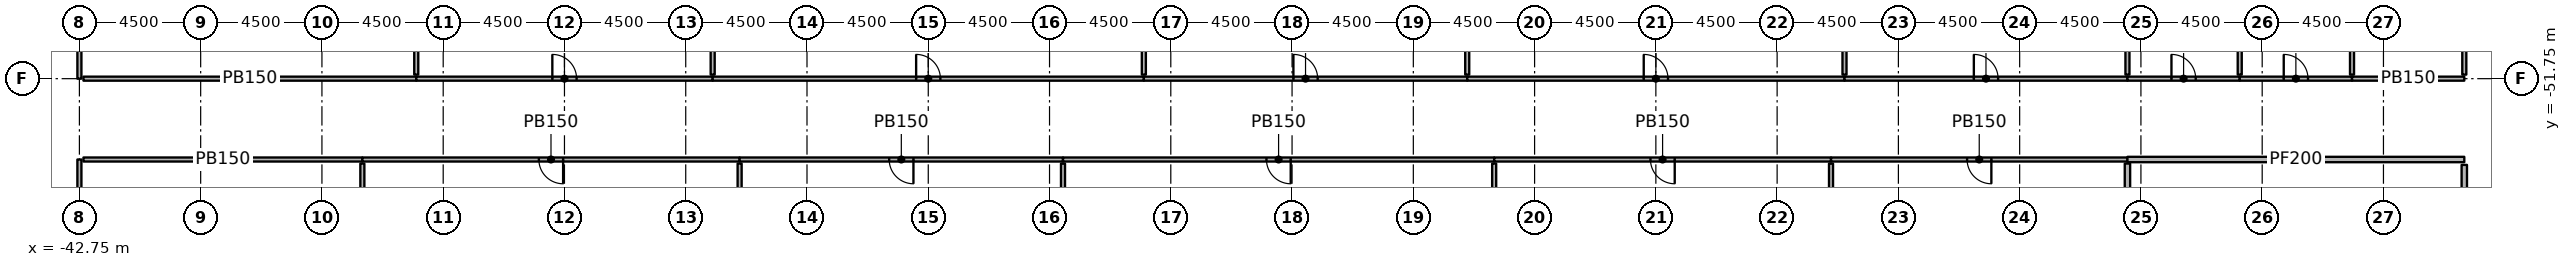
"""IFC4 building model, lengths in metres.
Left out: names, types, materials, properties, quantities, classifications, styles, units other than length and angle.
Written with IfcOpenShell. Run it as: python <this file> out.ifc"""

import sys

from ifc_helpers import new_model, si_unit, direction, frame, frame_2d, origin, place, context, subcontext, project, spatial, rectangle, extrude, element, fill, save


model = new_model("IFC4")
c1 = context("Model", 3, precision=1e-05, world=origin(), true_north=direction((0.0, 1.0)))
c2 = subcontext(c1, "Body", "Model", "MODEL_VIEW")
j1 = project(units=[si_unit("LENGTHUNIT", "METRE"), si_unit("PLANEANGLEUNIT", "RADIAN")], contexts=[c1])
p1 = place(None, origin())
s1 = spatial("IfcSite", under=j1, at=p1, CompositionType="ELEMENT")
p2 = place(p1, origin())
s2 = spatial("IfcBuilding", under=s1, at=p2, CompositionType="ELEMENT")
p3 = place(p2, frame((0.0, 0.0, -4.0)))
s3 = spatial("IfcBuildingStorey", under=s2, at=p3, CompositionType="ELEMENT", Elevation=-4.0)
p4 = place(p3, frame((-42.75, -54.75, 0.0), z_axis=(0.0, 0.0, 1.0), x_axis=(0.0, -1.0, 0.0)))
e1 = element("IfcWall", 1, at=p4, inside=s3, PredefinedType="PARTITIONING", context=c2, shape_type="SweptSolid", body=[
    extrude(rectangle(XDim=15.0, YDim=0.15, at=frame_2d((7.5, 0.0))), origin(), (0.0, 0.0, 1.0), 3.1),
])
p5 = place(p4, frame((7.05, 0.0, 0.0)))
e2 = element("IfcOpeningElement", 2, at=p5, cuts=e1, PredefinedType="OPENING", context=c2, shape_type="SweptSolid", body=[
    extrude(rectangle(XDim=0.9, YDim=2.1, at=frame_2d((0.45, 1.05))), frame((0.0, 0.085, 0.0), z_axis=(0.0, -1.0, 0.0), x_axis=(1.0, 0.0, 0.0)), (0.0, 0.0, 1.0), 0.17),
])
p6 = place(p3, frame((-42.75, -36.75, 0.0), z_axis=(0.0, 0.0, 1.0), x_axis=(0.0, -1.0, 0.0)))
e3 = element("IfcWall", 3, at=p6, inside=s3, PredefinedType="PARTITIONING", context=c2, shape_type="SweptSolid", body=[
    extrude(rectangle(XDim=15.0, YDim=0.15, at=frame_2d((7.5, 0.0))), origin(), (0.0, 0.0, 1.0), 3.1),
])
p7 = place(p6, frame((7.05, 0.0, 0.0)))
e4 = element("IfcOpeningElement", 4, at=p7, cuts=e3, PredefinedType="OPENING", context=c2, shape_type="SweptSolid", body=[
    extrude(rectangle(XDim=0.9, YDim=2.1, at=frame_2d((0.45, 1.05))), frame((0.0, 0.085, 0.0), z_axis=(0.0, -1.0, 0.0), x_axis=(1.0, 0.0, 0.0)), (0.0, 0.0, 1.0), 0.17),
])
p8 = place(p3, frame((-32.25, -54.75, 0.0), z_axis=(0.0, 0.0, 1.0), x_axis=(-1.0, 0.0, 0.0)))
e5 = element("IfcWall", 5, at=p8, inside=s3, PredefinedType="PARTITIONING", context=c2, shape_type="SweptSolid", body=[
    extrude(rectangle(XDim=10.35, YDim=0.15, at=frame_2d((5.175, 0.0))), origin(), (0.0, 0.0, 1.0), 3.1),
])
p9 = place(p3, frame((-18.25, -54.75, 0.0), z_axis=(0.0, 0.0, 1.0), x_axis=(-1.0, 0.0, 0.0)))
e6 = element("IfcWall", 6, at=p9, inside=s3, PredefinedType="PARTITIONING", context=c2, shape_type="SweptSolid", body=[
    extrude(rectangle(XDim=14.0, YDim=0.15, at=frame_2d((7.0, 0.0))), origin(), (0.0, 0.0, 1.0), 3.1),
])
p10 = place(p9, frame((6.55, 0.0, 0.0)))
e7 = element("IfcOpeningElement", 7, at=p10, cuts=e6, PredefinedType="OPENING", context=c2, shape_type="SweptSolid", body=[
    extrude(rectangle(XDim=0.9, YDim=2.1, at=frame_2d((0.45, 1.05))), frame((0.0, 0.085, 0.0), z_axis=(0.0, -1.0, 0.0), x_axis=(1.0, 0.0, 0.0)), (0.0, 0.0, 1.0), 0.17),
])
p11 = place(p3, frame((-6.25, -54.75, 0.0), z_axis=(0.0, 0.0, 1.0), x_axis=(-1.0, 0.0, 0.0)))
e8 = element("IfcWall", 8, at=p11, inside=s3, PredefinedType="PARTITIONING", context=c2, shape_type="SweptSolid", body=[
    extrude(rectangle(XDim=12.0, YDim=0.15, at=frame_2d((6.0, 0.0))), origin(), (0.0, 0.0, 1.0), 3.1),
])
p12 = place(p11, frame((5.55, 0.0, 0.0)))
e9 = element("IfcOpeningElement", 9, at=p12, cuts=e8, PredefinedType="OPENING", context=c2, shape_type="SweptSolid", body=[
    extrude(rectangle(XDim=0.9, YDim=2.1, at=frame_2d((0.45, 1.05))), frame((0.0, 0.085, 0.0), z_axis=(0.0, -1.0, 0.0), x_axis=(1.0, 0.0, 0.0)), (0.0, 0.0, 1.0), 0.17),
])
p13 = place(p3, frame((9.75, -54.75, 0.0), z_axis=(0.0, 0.0, 1.0), x_axis=(-1.0, 0.0, 0.0)))
e10 = element("IfcWall", 10, at=p13, inside=s3, PredefinedType="PARTITIONING", context=c2, shape_type="SweptSolid", body=[
    extrude(rectangle(XDim=16.0, YDim=0.15, at=frame_2d((8.0, 0.0))), origin(), (0.0, 0.0, 1.0), 3.1),
])
p14 = place(p13, frame((7.55, 0.0, 0.0)))
e11 = element("IfcOpeningElement", 11, at=p14, cuts=e10, PredefinedType="OPENING", context=c2, shape_type="SweptSolid", body=[
    extrude(rectangle(XDim=0.9, YDim=2.1, at=frame_2d((0.45, 1.05))), frame((0.0, 0.085, 0.0), z_axis=(0.0, -1.0, 0.0), x_axis=(1.0, 0.0, 0.0)), (0.0, 0.0, 1.0), 0.17),
])
p15 = place(p3, frame((22.25, -54.75, 0.0), z_axis=(0.0, 0.0, 1.0), x_axis=(-1.0, 0.0, 0.0)))
e12 = element("IfcWall", 12, at=p15, inside=s3, PredefinedType="PARTITIONING", context=c2, shape_type="SweptSolid", body=[
    extrude(rectangle(XDim=12.5, YDim=0.15, at=frame_2d((6.25, 0.0))), origin(), (0.0, 0.0, 1.0), 3.1),
])
p16 = place(p15, frame((5.8, 0.0, 0.0)))
e13 = element("IfcOpeningElement", 13, at=p16, cuts=e12, PredefinedType="OPENING", context=c2, shape_type="SweptSolid", body=[
    extrude(rectangle(XDim=0.9, YDim=2.1, at=frame_2d((0.45, 1.05))), frame((0.0, 0.085, 0.0), z_axis=(0.0, -1.0, 0.0), x_axis=(1.0, 0.0, 0.0)), (0.0, 0.0, 1.0), 0.17),
])
p17 = place(p3, frame((33.25, -54.75, 0.0), z_axis=(0.0, 0.0, 1.0), x_axis=(-1.0, 0.0, 0.0)))
e14 = element("IfcWall", 14, at=p17, inside=s3, PredefinedType="PARTITIONING", context=c2, shape_type="SweptSolid", body=[
    extrude(rectangle(XDim=11.0, YDim=0.15, at=frame_2d((5.5, 0.0))), origin(), (0.0, 0.0, 1.0), 3.1),
])
p18 = place(p17, frame((5.05, 0.0, 0.0)))
e15 = element("IfcOpeningElement", 15, at=p18, cuts=e14, PredefinedType="OPENING", context=c2, shape_type="SweptSolid", body=[
    extrude(rectangle(XDim=0.9, YDim=2.1, at=frame_2d((0.45, 1.05))), frame((0.0, 0.085, 0.0), z_axis=(0.0, -1.0, 0.0), x_axis=(1.0, 0.0, 0.0)), (0.0, 0.0, 1.0), 0.17),
])
p19 = place(p3, frame((45.75, -54.75, 0.0), z_axis=(0.0, 0.0, 1.0), x_axis=(-1.0, 0.0, 0.0)))
e16 = element("IfcWall", 16, at=p19, inside=s3, PredefinedType="PARTITIONING", context=c2, shape_type="SweptSolid", body=[
    extrude(rectangle(XDim=12.5, YDim=0.2, at=frame_2d((6.25, 0.0))), origin(), (0.0, 0.0, 1.0), 3.1),
])
p20 = place(p3, frame((-42.6, -51.75, 0.0), z_axis=(0.0, 0.0, 1.0), x_axis=(1.0, 0.0, 0.0)))
e17 = element("IfcWall", 17, at=p20, inside=s3, PredefinedType="PARTITIONING", context=c2, shape_type="SweptSolid", body=[
    extrude(rectangle(XDim=12.35, YDim=0.15, at=frame_2d((6.175, 0.0))), origin(), (0.0, 0.0, 1.0), 3.1),
])
p21 = place(p3, frame((-30.25, -51.75, 0.0), z_axis=(0.0, 0.0, 1.0), x_axis=(1.0, 0.0, 0.0)))
e18 = element("IfcWall", 18, at=p21, inside=s3, PredefinedType="PARTITIONING", context=c2, shape_type="SweptSolid", body=[
    extrude(rectangle(XDim=11.0, YDim=0.15, at=frame_2d((5.5, 0.0))), origin(), (0.0, 0.0, 1.0), 3.1),
])
p22 = place(p21, frame((5.05, 0.0, 0.0)))
e19 = element("IfcOpeningElement", 19, at=p22, cuts=e18, PredefinedType="OPENING", context=c2, shape_type="SweptSolid", body=[
    extrude(rectangle(XDim=0.9, YDim=2.1, at=frame_2d((0.45, 1.05))), frame((0.0, 0.085, 0.0), z_axis=(0.0, -1.0, 0.0), x_axis=(1.0, 0.0, 0.0)), (0.0, 0.0, 1.0), 0.17),
])
p23 = place(p3, frame((-19.25, -51.75, 0.0), z_axis=(0.0, 0.0, 1.0), x_axis=(1.0, 0.0, 0.0)))
e20 = element("IfcWall", 20, at=p23, inside=s3, PredefinedType="PARTITIONING", context=c2, shape_type="SweptSolid", body=[
    extrude(rectangle(XDim=16.0, YDim=0.15, at=frame_2d((8.0, 0.0))), origin(), (0.0, 0.0, 1.0), 3.1),
])
p24 = place(p23, frame((7.55, 0.0, 0.0)))
e21 = element("IfcOpeningElement", 21, at=p24, cuts=e20, PredefinedType="OPENING", context=c2, shape_type="SweptSolid", body=[
    extrude(rectangle(XDim=0.9, YDim=2.1, at=frame_2d((0.45, 1.05))), frame((0.0, 0.085, 0.0), z_axis=(0.0, -1.0, 0.0), x_axis=(1.0, 0.0, 0.0)), (0.0, 0.0, 1.0), 0.17),
])
p25 = place(p3, frame((-3.25, -51.75, 0.0), z_axis=(0.0, 0.0, 1.0), x_axis=(1.0, 0.0, 0.0)))
e22 = element("IfcWall", 22, at=p25, inside=s3, PredefinedType="PARTITIONING", context=c2, shape_type="SweptSolid", body=[
    extrude(rectangle(XDim=12.0, YDim=0.15, at=frame_2d((6.0, 0.0))), origin(), (0.0, 0.0, 1.0), 3.1),
])
p26 = place(p25, frame((5.55, 0.0, 0.0)))
e23 = element("IfcOpeningElement", 23, at=p26, cuts=e22, PredefinedType="OPENING", context=c2, shape_type="SweptSolid", body=[
    extrude(rectangle(XDim=0.9, YDim=2.1, at=frame_2d((0.45, 1.05))), frame((0.0, 0.085, 0.0), z_axis=(0.0, -1.0, 0.0), x_axis=(1.0, 0.0, 0.0)), (0.0, 0.0, 1.0), 0.17),
])
p27 = place(p3, frame((8.75, -51.75, 0.0), z_axis=(0.0, 0.0, 1.0), x_axis=(1.0, 0.0, 0.0)))
e24 = element("IfcWall", 24, at=p27, inside=s3, PredefinedType="PARTITIONING", context=c2, shape_type="SweptSolid", body=[
    extrude(rectangle(XDim=14.0, YDim=0.15, at=frame_2d((7.0, 0.0))), origin(), (0.0, 0.0, 1.0), 3.1),
])
p28 = place(p27, frame((6.55, 0.0, 0.0)))
e25 = element("IfcOpeningElement", 25, at=p28, cuts=e24, PredefinedType="OPENING", context=c2, shape_type="SweptSolid", body=[
    extrude(rectangle(XDim=0.9, YDim=2.1, at=frame_2d((0.45, 1.05))), frame((0.0, 0.085, 0.0), z_axis=(0.0, -1.0, 0.0), x_axis=(1.0, 0.0, 0.0)), (0.0, 0.0, 1.0), 0.17),
])
p29 = place(p3, frame((22.75, -51.75, 0.0), z_axis=(0.0, 0.0, 1.0), x_axis=(1.0, 0.0, 0.0)))
e26 = element("IfcWall", 26, at=p29, inside=s3, PredefinedType="PARTITIONING", context=c2, shape_type="SweptSolid", body=[
    extrude(rectangle(XDim=10.5, YDim=0.15, at=frame_2d((5.25, 0.0))), origin(), (0.0, 0.0, 1.0), 3.1),
])
p30 = place(p29, frame((4.8, 0.0, 0.0)))
e27 = element("IfcOpeningElement", 27, at=p30, cuts=e26, PredefinedType="OPENING", context=c2, shape_type="SweptSolid", body=[
    extrude(rectangle(XDim=0.9, YDim=2.1, at=frame_2d((0.45, 1.05))), frame((0.0, 0.085, 0.0), z_axis=(0.0, -1.0, 0.0), x_axis=(1.0, 0.0, 0.0)), (0.0, 0.0, 1.0), 0.17),
])
p31 = place(p3, frame((33.25, -51.75, 0.0), z_axis=(0.0, 0.0, 1.0), x_axis=(1.0, 0.0, 0.0)))
e28 = element("IfcWall", 28, at=p31, inside=s3, PredefinedType="PARTITIONING", context=c2, shape_type="SweptSolid", body=[
    extrude(rectangle(XDim=4.167, YDim=0.15, at=frame_2d((2.083, 0.0))), origin(), (0.0, 0.0, 1.0), 3.1),
])
p32 = place(p31, frame((1.633, 0.0, 0.0)))
e29 = element("IfcOpeningElement", 29, at=p32, cuts=e28, PredefinedType="OPENING", context=c2, shape_type="SweptSolid", body=[
    extrude(rectangle(XDim=0.9, YDim=2.1, at=frame_2d((0.45, 1.05))), frame((0.0, 0.085, 0.0), z_axis=(0.0, -1.0, 0.0), x_axis=(1.0, 0.0, 0.0)), (0.0, 0.0, 1.0), 0.17),
])
p33 = place(p3, frame((37.417, -51.75, 0.0), z_axis=(0.0, 0.0, 1.0), x_axis=(1.0, 0.0, 0.0)))
e30 = element("IfcWall", 30, at=p33, inside=s3, PredefinedType="PARTITIONING", context=c2, shape_type="SweptSolid", body=[
    extrude(rectangle(XDim=4.167, YDim=0.15, at=frame_2d((2.083, 0.0))), origin(), (0.0, 0.0, 1.0), 3.1),
])
p34 = place(p33, frame((1.633, 0.0, 0.0)))
e31 = element("IfcOpeningElement", 31, at=p34, cuts=e30, PredefinedType="OPENING", context=c2, shape_type="SweptSolid", body=[
    extrude(rectangle(XDim=0.9, YDim=2.1, at=frame_2d((0.45, 1.05))), frame((0.0, 0.085, 0.0), z_axis=(0.0, -1.0, 0.0), x_axis=(1.0, 0.0, 0.0)), (0.0, 0.0, 1.0), 0.17),
])
p35 = place(p3, frame((41.583, -51.75, 0.0), z_axis=(0.0, 0.0, 1.0), x_axis=(1.0, 0.0, 0.0)))
e32 = element("IfcWall", 32, at=p35, inside=s3, PredefinedType="PARTITIONING", context=c2, shape_type="SweptSolid", body=[
    extrude(rectangle(XDim=4.167, YDim=0.15, at=frame_2d((2.083, 0.0))), origin(), (0.0, 0.0, 1.0), 3.1),
])
for number, where, z_axis, x_axis in (
    (33, (-32.25, -54.9, 0.0), (0.0, 0.0, 1.0), (0.0, -1.0, 0.0)),
    (34, (-18.25, -54.9, 0.0), (0.0, 0.0, 1.0), (0.0, -1.0, 0.0)),
    (35, (-6.25, -54.9, 0.0), (0.0, 0.0, 1.0), (0.0, -1.0, 0.0)),
    (36, (9.75, -54.9, 0.0), (0.0, 0.0, 1.0), (0.0, -1.0, 0.0)),
):
    element("IfcWall", number, at=place(p3, frame(where, z_axis=z_axis, x_axis=x_axis)), inside=s3, PredefinedType="PARTITIONING", context=c2, shape_type="SweptSolid", body=[
        extrude(rectangle(XDim=14.85, YDim=0.15, at=frame_2d((7.425, 0.0))), origin(), (0.0, 0.0, 1.0), 3.1),
    ])
p36 = place(p3, frame((22.25, -54.9, 0.0), z_axis=(0.0, 0.0, 1.0), x_axis=(0.0, -1.0, 0.0)))
e37 = element("IfcWall", 37, at=p36, inside=s3, PredefinedType="PARTITIONING", context=c2, shape_type="SweptSolid", body=[
    extrude(rectangle(XDim=6.0, YDim=0.15, at=frame_2d((3.0, 0.0))), origin(), (0.0, 0.0, 1.0), 3.1),
])
p37 = place(p3, frame((33.25, -54.9, 0.0), z_axis=(0.0, 0.0, 1.0), x_axis=(0.0, -1.0, 0.0)))
e38 = element("IfcWall", 38, at=p37, inside=s3, PredefinedType="PARTITIONING", context=c2, shape_type="SweptSolid", body=[
    extrude(rectangle(XDim=14.85, YDim=0.2, at=frame_2d((7.425, 0.0))), origin(), (0.0, 0.0, 1.0), 3.1),
])
p38 = place(p3, frame((45.75, -69.75, 0.0), z_axis=(0.0, 0.0, 1.0), x_axis=(0.0, 1.0, 0.0)))
e39 = element("IfcWall", 39, at=p38, inside=s3, PredefinedType="PARTITIONING", context=c2, shape_type="SweptSolid", body=[
    extrude(rectangle(XDim=14.8, YDim=0.2, at=frame_2d((7.4, 0.0))), origin(), (0.0, 0.0, 1.0), 3.1),
])
p39 = place(p38, frame((6.95, 0.0, 0.0)))
e40 = element("IfcOpeningElement", 40, at=p39, cuts=e39, PredefinedType="OPENING", context=c2, shape_type="SweptSolid", body=[
    extrude(rectangle(XDim=0.9, YDim=2.1, at=frame_2d((0.45, 1.05))), frame((0.0, 0.11, 0.0), z_axis=(0.0, -1.0, 0.0), x_axis=(1.0, 0.0, 0.0)), (0.0, 0.0, 1.0), 0.22),
])
for number, where, z_axis, x_axis in (
    (41, (-30.25, -36.75, 0.0), (0.0, 0.0, 1.0), (0.0, -1.0, 0.0)),
    (42, (-19.25, -36.75, 0.0), (0.0, 0.0, 1.0), (0.0, -1.0, 0.0)),
    (43, (-3.25, -36.75, 0.0), (0.0, 0.0, 1.0), (0.0, -1.0, 0.0)),
    (44, (8.75, -36.75, 0.0), (0.0, 0.0, 1.0), (0.0, -1.0, 0.0)),
):
    element("IfcWall", number, at=place(p3, frame(where, z_axis=z_axis, x_axis=x_axis)), inside=s3, PredefinedType="PARTITIONING", context=c2, shape_type="SweptSolid", body=[
        extrude(rectangle(XDim=14.85, YDim=0.15, at=frame_2d((7.425, 0.0))), origin(), (0.0, 0.0, 1.0), 3.1),
    ])
p40 = place(p3, frame((22.75, -44.1, 0.0), z_axis=(0.0, 0.0, 1.0), x_axis=(0.0, -1.0, 0.0)))
e45 = element("IfcWall", 45, at=p40, inside=s3, PredefinedType="PARTITIONING", context=c2, shape_type="SweptSolid", body=[
    extrude(rectangle(XDim=7.5, YDim=0.15, at=frame_2d((3.75, 0.0))), origin(), (0.0, 0.0, 1.0), 3.1),
])
for number, where, z_axis, x_axis in (
    (46, (33.25, -36.75, 0.0), (0.0, 0.0, 1.0), (0.0, -1.0, 0.0)),
    (47, (37.417, -36.75, 0.0), (0.0, 0.0, 1.0), (0.0, -1.0, 0.0)),
    (48, (41.583, -36.75, 0.0), (0.0, 0.0, 1.0), (0.0, -1.0, 0.0)),
):
    element("IfcWall", number, at=place(p3, frame(where, z_axis=z_axis, x_axis=x_axis)), inside=s3, PredefinedType="PARTITIONING", context=c2, shape_type="SweptSolid", body=[
        extrude(rectangle(XDim=14.85, YDim=0.15, at=frame_2d((7.425, 0.0))), origin(), (0.0, 0.0, 1.0), 3.1),
    ])
p41 = place(p3, frame((45.75, -51.6, 0.0), z_axis=(0.0, 0.0, 1.0), x_axis=(0.0, 1.0, 0.0)))
e49 = element("IfcWall", 49, at=p41, inside=s3, PredefinedType="PARTITIONING", context=c2, shape_type="SweptSolid", body=[
    extrude(rectangle(XDim=14.7, YDim=0.15, at=frame_2d((7.35, 0.0))), origin(), (0.0, 0.0, 1.0), 3.1),
])
p42 = place(p41, frame((6.9, 0.0, 0.0)))
e50 = element("IfcOpeningElement", 50, at=p42, cuts=e49, PredefinedType="OPENING", context=c2, shape_type="SweptSolid", body=[
    extrude(rectangle(XDim=0.9, YDim=2.1, at=frame_2d((0.45, 1.05))), frame((0.0, 0.085, 0.0), z_axis=(0.0, -1.0, 0.0), x_axis=(1.0, 0.0, 0.0)), (0.0, 0.0, 1.0), 0.17),
])
p43 = place(p10, origin())
e51 = element("IfcDoor", 51, at=p43, inside=s3, OperationType="SINGLE_SWING_LEFT", PredefinedType="DOOR", context=c2, shape_type="SweptSolid", body=[
    extrude(rectangle(XDim=0.9, YDim=2.1, at=frame_2d((0.45, 1.05))), frame((0.0, 0.025, 0.0), z_axis=(0.0, -1.0, 0.0), x_axis=(1.0, 0.0, 0.0)), (0.0, 0.0, 1.0), 0.05),
])
fill(e7, e51)
p44 = place(p12, origin())
e52 = element("IfcDoor", 52, at=p44, inside=s3, OperationType="SINGLE_SWING_LEFT", PredefinedType="DOOR", context=c2, shape_type="SweptSolid", body=[
    extrude(rectangle(XDim=0.9, YDim=2.1, at=frame_2d((0.45, 1.05))), frame((0.0, 0.025, 0.0), z_axis=(0.0, -1.0, 0.0), x_axis=(1.0, 0.0, 0.0)), (0.0, 0.0, 1.0), 0.05),
])
fill(e9, e52)
p45 = place(p14, origin())
e53 = element("IfcDoor", 53, at=p45, inside=s3, OperationType="SINGLE_SWING_LEFT", PredefinedType="DOOR", context=c2, shape_type="SweptSolid", body=[
    extrude(rectangle(XDim=0.9, YDim=2.1, at=frame_2d((0.45, 1.05))), frame((0.0, 0.025, 0.0), z_axis=(0.0, -1.0, 0.0), x_axis=(1.0, 0.0, 0.0)), (0.0, 0.0, 1.0), 0.05),
])
fill(e11, e53)
p46 = place(p16, origin())
e54 = element("IfcDoor", 54, at=p46, inside=s3, OperationType="SINGLE_SWING_LEFT", PredefinedType="DOOR", context=c2, shape_type="SweptSolid", body=[
    extrude(rectangle(XDim=0.9, YDim=2.1, at=frame_2d((0.45, 1.05))), frame((0.0, 0.025, 0.0), z_axis=(0.0, -1.0, 0.0), x_axis=(1.0, 0.0, 0.0)), (0.0, 0.0, 1.0), 0.05),
])
fill(e13, e54)
p47 = place(p18, origin())
e55 = element("IfcDoor", 55, at=p47, inside=s3, OperationType="SINGLE_SWING_LEFT", PredefinedType="DOOR", context=c2, shape_type="SweptSolid", body=[
    extrude(rectangle(XDim=0.9, YDim=2.1, at=frame_2d((0.45, 1.05))), frame((0.0, 0.025, 0.0), z_axis=(0.0, -1.0, 0.0), x_axis=(1.0, 0.0, 0.0)), (0.0, 0.0, 1.0), 0.05),
])
fill(e15, e55)
p48 = place(p22, origin())
e56 = element("IfcDoor", 56, at=p48, inside=s3, OperationType="SINGLE_SWING_LEFT", PredefinedType="DOOR", context=c2, shape_type="SweptSolid", body=[
    extrude(rectangle(XDim=0.9, YDim=2.1, at=frame_2d((0.45, 1.05))), frame((0.0, 0.025, 0.0), z_axis=(0.0, -1.0, 0.0), x_axis=(1.0, 0.0, 0.0)), (0.0, 0.0, 1.0), 0.05),
])
fill(e19, e56)
p49 = place(p24, origin())
e57 = element("IfcDoor", 57, at=p49, inside=s3, OperationType="SINGLE_SWING_LEFT", PredefinedType="DOOR", context=c2, shape_type="SweptSolid", body=[
    extrude(rectangle(XDim=0.9, YDim=2.1, at=frame_2d((0.45, 1.05))), frame((0.0, 0.025, 0.0), z_axis=(0.0, -1.0, 0.0), x_axis=(1.0, 0.0, 0.0)), (0.0, 0.0, 1.0), 0.05),
])
fill(e21, e57)
p50 = place(p26, origin())
e58 = element("IfcDoor", 58, at=p50, inside=s3, OperationType="SINGLE_SWING_LEFT", PredefinedType="DOOR", context=c2, shape_type="SweptSolid", body=[
    extrude(rectangle(XDim=0.9, YDim=2.1, at=frame_2d((0.45, 1.05))), frame((0.0, 0.025, 0.0), z_axis=(0.0, -1.0, 0.0), x_axis=(1.0, 0.0, 0.0)), (0.0, 0.0, 1.0), 0.05),
])
fill(e23, e58)
p51 = place(p28, origin())
e59 = element("IfcDoor", 59, at=p51, inside=s3, OperationType="SINGLE_SWING_LEFT", PredefinedType="DOOR", context=c2, shape_type="SweptSolid", body=[
    extrude(rectangle(XDim=0.9, YDim=2.1, at=frame_2d((0.45, 1.05))), frame((0.0, 0.025, 0.0), z_axis=(0.0, -1.0, 0.0), x_axis=(1.0, 0.0, 0.0)), (0.0, 0.0, 1.0), 0.05),
])
fill(e25, e59)
p52 = place(p30, origin())
e60 = element("IfcDoor", 60, at=p52, inside=s3, OperationType="SINGLE_SWING_LEFT", PredefinedType="DOOR", context=c2, shape_type="SweptSolid", body=[
    extrude(rectangle(XDim=0.9, YDim=2.1, at=frame_2d((0.45, 1.05))), frame((0.0, 0.025, 0.0), z_axis=(0.0, -1.0, 0.0), x_axis=(1.0, 0.0, 0.0)), (0.0, 0.0, 1.0), 0.05),
])
fill(e27, e60)
p53 = place(p32, origin())
e61 = element("IfcDoor", 61, at=p53, inside=s3, OperationType="SINGLE_SWING_LEFT", PredefinedType="DOOR", context=c2, shape_type="SweptSolid", body=[
    extrude(rectangle(XDim=0.9, YDim=2.1, at=frame_2d((0.45, 1.05))), frame((0.0, 0.025, 0.0), z_axis=(0.0, -1.0, 0.0), x_axis=(1.0, 0.0, 0.0)), (0.0, 0.0, 1.0), 0.05),
])
fill(e29, e61)
p54 = place(p34, origin())
e62 = element("IfcDoor", 62, at=p54, inside=s3, OperationType="SINGLE_SWING_LEFT", PredefinedType="DOOR", context=c2, shape_type="SweptSolid", body=[
    extrude(rectangle(XDim=0.9, YDim=2.1, at=frame_2d((0.45, 1.05))), frame((0.0, 0.025, 0.0), z_axis=(0.0, -1.0, 0.0), x_axis=(1.0, 0.0, 0.0)), (0.0, 0.0, 1.0), 0.05),
])
fill(e31, e62)
save(model, sys.argv[1])
